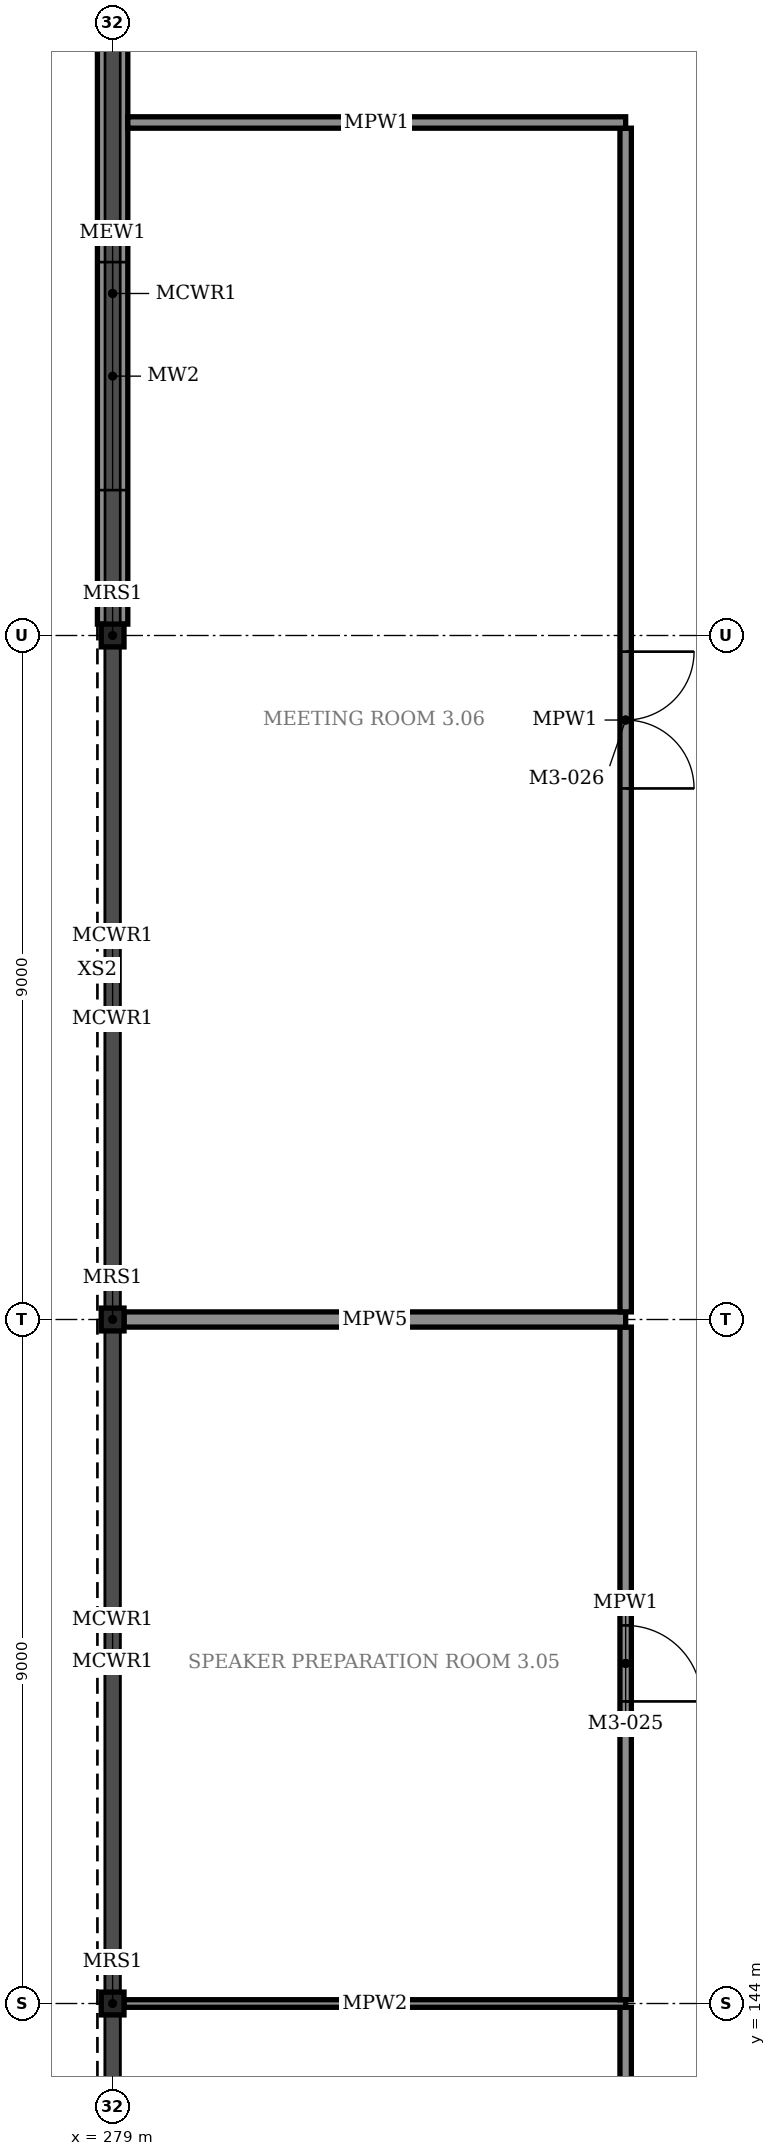
"""IFC4 building model, lengths in metres.
Left out: names, types, materials, properties, quantities, classifications, styles, units other than length and angle.
Written with IfcOpenShell. Run it as: python <this file> out.ifc"""

import sys

from ifc_helpers import new_model, si_unit, direction, frame, frame_2d, origin, origin_2d, place, context, subcontext, project, spatial, rectangle, hollow_rectangle, extrude, element, fill, save


model = new_model("IFC4")
c1 = context("Model", 3, precision=1e-05, world=origin(), true_north=direction((0.0, 1.0)))
c2 = subcontext(c1, "Body", "Model", "MODEL_VIEW")
j1 = project(units=[si_unit("LENGTHUNIT", "METRE"), si_unit("PLANEANGLEUNIT", "RADIAN")], contexts=[c1])
p1 = place(None, origin())
s1 = spatial("IfcSite", under=j1, at=p1, CompositionType="ELEMENT")
p2 = place(p1, origin())
s2 = spatial("IfcBuilding", under=s1, at=p2, CompositionType="ELEMENT")
p3 = place(p2, frame((0.0, 0.0, 17.0)))
s3 = spatial("IfcBuildingStorey", under=s2, at=p3, CompositionType="ELEMENT", Elevation=17.0)
for number, where, z_axis, x_axis in (
    (1, (279.0, 144.0, 0.0), (0.0, 0.0, 1.0), (1.0, 0.0, 0.0)),
    (2, (279.0, 153.0, 0.0), (0.0, 0.0, 1.0), (1.0, 0.0, 0.0)),
    (3, (279.0, 162.0, 0.0), (0.0, 0.0, 1.0), (1.0, 0.0, 0.0)),
):
    element("IfcColumn", number, at=place(p3, frame(where, z_axis=z_axis, x_axis=x_axis)), inside=s3, PredefinedType="COLUMN", context=c2, shape_type="SweptSolid", body=[
        extrude(hollow_rectangle(XDim=0.3, YDim=0.3, WallThickness=0.012, InnerFilletRadius=0.024, OuterFilletRadius=0.036, at=origin_2d()), origin(), (0.0, 0.0, 1.0), 3.1),
    ])
p4 = place(p3, frame((279.0, 162.15, 0.0), z_axis=(0.0, 0.0, 1.0), x_axis=(0.0, 1.0, 0.0)))
e4 = element("IfcWall", 4, at=p4, inside=s3, PredefinedType="STANDARD", context=c2, shape_type="SweptSolid", body=[
    extrude(rectangle(XDim=8.7, YDim=0.4, at=frame_2d((4.35, 0.0))), origin(), (0.0, 0.0, 1.0), 3.3),
])
p5 = place(p4, frame((1.763, 0.0, 0.9)))
e5 = element("IfcOpeningElement", 5, at=p5, cuts=e4, PredefinedType="OPENING", context=c2, shape_type="SweptSolid", body=[
    extrude(rectangle(XDim=3.0, YDim=2.1, at=frame_2d((1.5, 1.05))), frame((0.0, 0.21, 0.0), z_axis=(0.0, -1.0, 0.0), x_axis=(1.0, 0.0, 0.0)), (0.0, 0.0, 1.0), 0.42),
])
p6 = place(p3, frame((279.15, 144.0, 0.0), z_axis=(0.0, 0.0, 1.0), x_axis=(1.0, 0.0, 0.0)))
e6 = element("IfcWall", 6, at=p6, inside=s3, PredefinedType="PARTITIONING", context=c2, shape_type="SweptSolid", body=[
    extrude(rectangle(XDim=6.6, YDim=0.1, at=frame_2d((3.3, 0.0))), origin(), (0.0, 0.0, 1.0), 3.0),
])
p7 = place(p3, frame((285.75, 135.05, 0.0), z_axis=(0.0, 0.0, 1.0), x_axis=(0.0, 1.0, 0.0)))
e7 = element("IfcWall", 7, at=p7, inside=s3, PredefinedType="PARTITIONING", context=c2, shape_type="SweptSolid", body=[
    extrude(rectangle(XDim=8.9, YDim=0.15, at=frame_2d((4.45, 0.0))), origin(), (0.0, 0.0, 1.0), 3.0),
])
p8 = place(p7, frame((3.95, 0.0, 0.0)))
e8 = element("IfcOpeningElement", 8, at=p8, cuts=e7, PredefinedType="OPENING", context=c2, shape_type="SweptSolid", body=[
    extrude(rectangle(XDim=1.0, YDim=2.4, at=frame_2d((0.5, 1.2))), frame((0.0, 0.085, 0.0), z_axis=(0.0, -1.0, 0.0), x_axis=(1.0, 0.0, 0.0)), (0.0, 0.0, 1.0), 0.17),
])
p9 = place(p3, frame((279.15, 153.0, 0.0), z_axis=(0.0, 0.0, 1.0), x_axis=(1.0, 0.0, 0.0)))
e9 = element("IfcWall", 9, at=p9, inside=s3, PredefinedType="PARTITIONING", context=c2, shape_type="SweptSolid", body=[
    extrude(rectangle(XDim=6.6, YDim=0.2, at=frame_2d((3.3, 0.0))), origin(), (0.0, 0.0, 1.0), 3.0),
])
p10 = place(p3, frame((285.75, 144.05, 0.0), z_axis=(0.0, 0.0, 1.0), x_axis=(0.0, 1.0, 0.0)))
e10 = element("IfcWall", 10, at=p10, inside=s3, PredefinedType="PARTITIONING", context=c2, shape_type="SweptSolid", body=[
    extrude(rectangle(XDim=8.85, YDim=0.15, at=frame_2d((4.425, 0.0))), origin(), (0.0, 0.0, 1.0), 3.0),
])
p11 = place(p10, frame((3.925, 0.0, 0.0)))
e11 = element("IfcOpeningElement", 11, at=p11, cuts=e10, PredefinedType="OPENING", context=c2, shape_type="SweptSolid", body=[
    extrude(rectangle(XDim=1.0, YDim=2.4, at=frame_2d((0.5, 1.2))), frame((0.0, 0.085, 0.0), z_axis=(0.0, -1.0, 0.0), x_axis=(1.0, 0.0, 0.0)), (0.0, 0.0, 1.0), 0.17),
])
p12 = place(p3, frame((279.2, 168.75, 0.0), z_axis=(0.0, 0.0, 1.0), x_axis=(1.0, 0.0, 0.0)))
e12 = element("IfcWall", 12, at=p12, inside=s3, PredefinedType="PARTITIONING", context=c2, shape_type="SweptSolid", body=[
    extrude(rectangle(XDim=6.55, YDim=0.15, at=frame_2d((3.275, 0.0))), origin(), (0.0, 0.0, 1.0), 3.0),
])
p13 = place(p3, frame((285.75, 153.1, 0.0), z_axis=(0.0, 0.0, 1.0), x_axis=(0.0, 1.0, 0.0)))
e13 = element("IfcWall", 13, at=p13, inside=s3, PredefinedType="PARTITIONING", context=c2, shape_type="SweptSolid", body=[
    extrude(rectangle(XDim=15.575, YDim=0.15, at=frame_2d((7.788, 0.0))), origin(), (0.0, 0.0, 1.0), 3.0),
])
p14 = place(p13, frame((6.887, 0.0, 0.0)))
e14 = element("IfcOpeningElement", 14, at=p14, cuts=e13, PredefinedType="OPENING", context=c2, shape_type="SweptSolid", body=[
    extrude(rectangle(XDim=1.8, YDim=2.4, at=frame_2d((0.9, 1.2))), frame((0.0, 0.085, 0.0), z_axis=(0.0, -1.0, 0.0), x_axis=(1.0, 0.0, 0.0)), (0.0, 0.0, 1.0), 0.17),
])
p15 = place(p5, origin())
e15 = element("IfcWindow", 15, at=p15, inside=s3, PartitioningType="TRIPLE_PANEL_VERTICAL", PredefinedType="WINDOW", context=c2, shape_type="SweptSolid", body=[
    extrude(rectangle(XDim=3.0, YDim=2.1, at=frame_2d((1.5, 1.05))), frame((0.0, 0.03, 0.0), z_axis=(0.0, -1.0, 0.0), x_axis=(1.0, 0.0, 0.0)), (0.0, 0.0, 1.0), 0.06),
])
fill(e5, e15)
p16 = place(p11, frame((1.0, 0.0, 0.0), z_axis=(0.0, 0.0, 1.0), x_axis=(-1.0, 0.0, 0.0)))
e16 = element("IfcDoor", 16, at=p16, inside=s3, OperationType="SINGLE_SWING_LEFT", PredefinedType="DOOR", context=c2, shape_type="SweptSolid", body=[
    extrude(rectangle(XDim=1.0, YDim=2.4, at=frame_2d((0.5, 1.2))), frame((0.0, 0.025, 0.0), z_axis=(0.0, -1.0, 0.0), x_axis=(1.0, 0.0, 0.0)), (0.0, 0.0, 1.0), 0.05),
])
fill(e11, e16)
p17 = place(p14, frame((1.8, 0.0, 0.0), z_axis=(0.0, 0.0, 1.0), x_axis=(-1.0, 0.0, 0.0)))
e17 = element("IfcDoor", 17, at=p17, inside=s3, OperationType="DOUBLE_DOOR_SINGLE_SWING", PredefinedType="DOOR", context=c2, shape_type="SweptSolid", body=[
    extrude(rectangle(XDim=1.8, YDim=2.4, at=frame_2d((0.9, 1.2))), frame((0.0, 0.025, 0.0), z_axis=(0.0, -1.0, 0.0), x_axis=(1.0, 0.0, 0.0)), (0.0, 0.0, 1.0), 0.05),
])
fill(e14, e17)
save(model, sys.argv[1])
